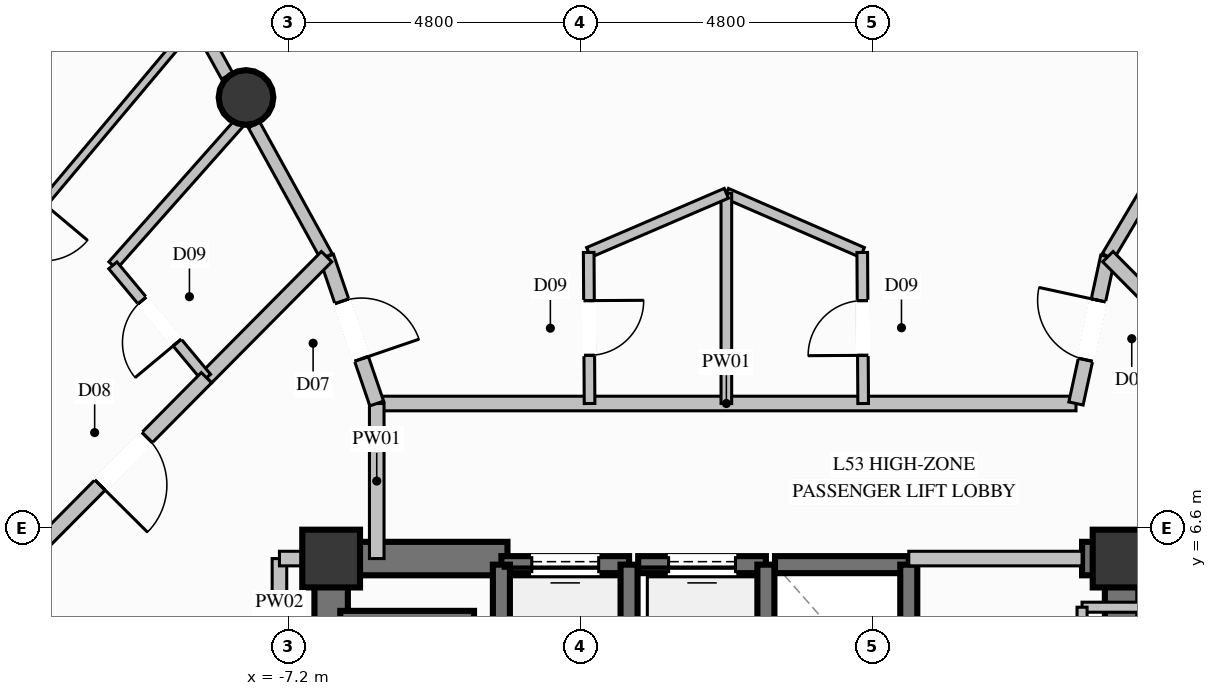
"""IFC4 building model, lengths in metres.
Left out: names, types, materials, properties, quantities, classifications, styles, units other than length and angle.
Written with IfcOpenShell. Run it as: python <this file> out.ifc"""

import sys

from ifc_helpers import new_model, si_unit, direction, frame, frame_2d, origin, origin_2d, place, context, subcontext, project, spatial, rectangle, circle, extrude, element, fill, save


model = new_model("IFC4")
c1 = context("Model", 3, precision=1e-05, world=origin(), true_north=direction((0.0, 1.0)))
c2 = subcontext(c1, "Body", "Model", "MODEL_VIEW")
j1 = project(units=[si_unit("LENGTHUNIT", "METRE"), si_unit("PLANEANGLEUNIT", "RADIAN")], contexts=[c1])
p1 = place(None, origin())
s1 = spatial("IfcSite", under=j1, at=p1, CompositionType="ELEMENT")
p2 = place(p1, origin())
s2 = spatial("IfcBuilding", under=s1, at=p2, CompositionType="ELEMENT")
p3 = place(p2, frame((0.0, 0.0, 205.6)))
s3 = spatial("IfcBuildingStorey", under=s2, at=p3, CompositionType="ELEMENT", Elevation=205.6)
for number, where, z_axis, x_axis in (
    (1, (6.5, 6.1, 0.0), (0.0, 0.0, 1.0), (1.0, 0.0, 0.0)),
    (2, (-6.5, 6.1, 0.0), (0.0, 0.0, 1.0), (1.0, 0.0, 0.0)),
):
    element("IfcColumn", number, at=place(p3, frame(where, z_axis=z_axis, x_axis=x_axis)), inside=s3, PredefinedType="COLUMN", context=c2, shape_type="SweptSolid", body=[
        extrude(rectangle(XDim=0.95, YDim=0.95, at=origin_2d()), origin(), (0.0, 0.0, 1.0), 3.6),
    ])
p4 = place(p3, frame((-6.225, 6.1, 0.0), z_axis=(0.0, 0.0, 1.0), x_axis=(1.0, 0.0, 0.0)))
e3 = element("IfcWall", 3, at=p4, inside=s3, PredefinedType="SHEAR", context=c2, shape_type="SweptSolid", body=[
    extrude(rectangle(XDim=2.625, YDim=0.55, at=frame_2d((1.312, 0.0))), origin(), (0.0, 0.0, 1.0), 3.6),
])
p5 = place(p3, frame((5.85, 6.1, 0.0), z_axis=(0.0, 0.0, 1.0), x_axis=(1.0, 0.0, 0.0)))
e4 = element("IfcWall", 4, at=p5, inside=s3, PredefinedType="SHEAR", context=c2, shape_type="SweptSolid", body=[
    extrude(rectangle(XDim=0.375, YDim=0.55, at=frame_2d((0.188, 0.0))), origin(), (0.0, 0.0, 1.0), 3.6),
])
p6 = place(p3, frame((-6.5, 2.35, 0.0), z_axis=(0.0, 0.0, 1.0), x_axis=(0.0, 1.0, 0.0)))
e5 = element("IfcWall", 5, at=p6, inside=s3, PredefinedType="SHEAR", context=c2, shape_type="SweptSolid", body=[
    extrude(rectangle(XDim=4.025, YDim=0.55, at=frame_2d((2.012, 0.0))), origin(), (0.0, 0.0, 1.0), 3.6),
])
p7 = place(p3, frame((6.5, 3.35, 0.0), z_axis=(0.0, 0.0, 1.0), x_axis=(0.0, 1.0, 0.0)))
e6 = element("IfcWall", 6, at=p7, inside=s3, PredefinedType="SHEAR", context=c2, shape_type="SweptSolid", body=[
    extrude(rectangle(XDim=3.025, YDim=0.55, at=frame_2d((1.512, 0.0))), origin(), (0.0, 0.0, 1.0), 3.6),
])
p8 = place(p3, frame((-7.9, 13.683, 0.0), z_axis=(0.0, 0.0, 1.0), x_axis=(1.0, 0.0, 0.0)))
e7 = element("IfcColumn", 7, at=p8, inside=s3, PredefinedType="COLUMN", context=c2, shape_type="SweptSolid", body=[
    extrude(circle(Radius=0.45, at=origin_2d()), origin(), (0.0, 0.0, 1.0), 3.6),
])
p9 = place(p3, frame((-1.6, 6.0, 0.0), z_axis=(0.0, 0.0, 1.0), x_axis=(-1.0, 0.0, 0.0)))
e8 = element("IfcWall", 8, at=p9, inside=s3, PredefinedType="SOLIDWALL", context=c2, shape_type="SweptSolid", body=[
    extrude(rectangle(XDim=2.1, YDim=0.28, at=frame_2d((1.05, 0.0))), origin(), (0.0, 0.0, 1.0), 3.36),
])
p10 = place(p9, frame((0.5, 0.0, 0.0)))
e9 = element("IfcOpeningElement", 9, at=p10, cuts=e8, PredefinedType="OPENING", context=c2, shape_type="SweptSolid", body=[
    extrude(rectangle(XDim=1.1, YDim=2.2, at=frame_2d((0.55, 1.1))), frame((0.0, 0.15, 0.0), z_axis=(0.0, -1.0, 0.0), x_axis=(1.0, 0.0, 0.0)), (0.0, 0.0, 1.0), 0.3),
])
for number, where, z_axis, x_axis in (
    (10, (-3.7, 6.0, 0.0), (0.0, 0.0, 1.0), (0.0, -1.0, 0.0)),
    (11, (-1.6, 3.5, 0.0), (0.0, 0.0, 1.0), (0.0, 1.0, 0.0)),
):
    element("IfcWall", number, at=place(p3, frame(where, z_axis=z_axis, x_axis=x_axis)), inside=s3, PredefinedType="SOLIDWALL", context=c2, shape_type="SweptSolid", body=[
        extrude(rectangle(XDim=2.5, YDim=0.28, at=frame_2d((1.25, 0.0))), origin(), (0.0, 0.0, 1.0), 3.36),
    ])
p11 = place(p3, frame((0.65, 6.0, 0.0), z_axis=(0.0, 0.0, 1.0), x_axis=(-1.0, 0.0, 0.0)))
e12 = element("IfcWall", 12, at=p11, inside=s3, PredefinedType="SOLIDWALL", context=c2, shape_type="SweptSolid", body=[
    extrude(rectangle(XDim=2.1, YDim=0.28, at=frame_2d((1.05, 0.0))), origin(), (0.0, 0.0, 1.0), 3.36),
])
p12 = place(p11, frame((0.5, 0.0, 0.0)))
e13 = element("IfcOpeningElement", 13, at=p12, cuts=e12, PredefinedType="OPENING", context=c2, shape_type="SweptSolid", body=[
    extrude(rectangle(XDim=1.1, YDim=2.2, at=frame_2d((0.55, 1.1))), frame((0.0, 0.15, 0.0), z_axis=(0.0, -1.0, 0.0), x_axis=(1.0, 0.0, 0.0)), (0.0, 0.0, 1.0), 0.3),
])
p13 = place(p3, frame((0.65, 3.5, 0.0), z_axis=(0.0, 0.0, 1.0), x_axis=(0.0, 1.0, 0.0)))
e14 = element("IfcWall", 14, at=p13, inside=s3, PredefinedType="SOLIDWALL", context=c2, shape_type="SweptSolid", body=[
    extrude(rectangle(XDim=2.5, YDim=0.28, at=frame_2d((1.25, 0.0))), origin(), (0.0, 0.0, 1.0), 3.36),
])
p14 = place(p3, frame((3.0, 6.0, 0.0), z_axis=(0.0, 0.0, 1.0), x_axis=(-1.0, 0.0, 0.0)))
e15 = element("IfcWall", 15, at=p14, inside=s3, PredefinedType="SOLIDWALL", context=c2, shape_type="SweptSolid", body=[
    extrude(rectangle(XDim=2.2, YDim=0.28, at=frame_2d((1.1, 0.0))), origin(), (0.0, 0.0, 1.0), 3.36),
])
p15 = place(p3, frame((3.0, 3.5, 0.0), z_axis=(0.0, 0.0, 1.0), x_axis=(0.0, 1.0, 0.0)))
e16 = element("IfcWall", 16, at=p15, inside=s3, PredefinedType="SOLIDWALL", context=c2, shape_type="SweptSolid", body=[
    extrude(rectangle(XDim=2.5, YDim=0.28, at=frame_2d((1.25, 0.0))), origin(), (0.0, 0.0, 1.0), 3.36),
])
p16 = place(p3, frame((-4.15, 5.1, 0.0), z_axis=(0.0, 0.0, 1.0), x_axis=(-1.0, 0.0, 0.0)))
e17 = element("IfcWall", 17, at=p16, inside=s3, PredefinedType="SOLIDWALL", context=c2, shape_type="SweptSolid", body=[
    extrude(rectangle(XDim=2.2, YDim=0.28, at=frame_2d((1.1, 0.0))), origin(), (0.0, 0.0, 1.0), 3.36),
])
p17 = place(p3, frame((-5.75, 8.65, 0.0), z_axis=(0.0, 0.0, 1.0), x_axis=(1.0, 0.0, 0.0)))
e18 = element("IfcWall", 18, at=p17, inside=s3, PredefinedType="PARTITIONING", context=c2, shape_type="SweptSolid", body=[
    extrude(rectangle(XDim=11.5, YDim=0.24, at=frame_2d((5.75, 0.0))), origin(), (0.0, 0.0, 1.0), 3.36),
])
p18 = place(p3, frame((3.0, 6.1, 0.0), z_axis=(0.0, 0.0, 1.0), x_axis=(1.0, 0.0, 0.0)))
e19 = element("IfcWall", 19, at=p18, inside=s3, PredefinedType="PARTITIONING", context=c2, shape_type="SweptSolid", body=[
    extrude(rectangle(XDim=2.85, YDim=0.24, at=frame_2d((1.425, 0.0))), origin(), (0.0, 0.0, 1.0), 2.445),
])
p19 = place(p3, frame((6.5, 6.1, 0.0), z_axis=(0.0, 0.0, 1.0), x_axis=(1.0, 0.0, 0.0)))
e20 = element("IfcWall", 20, at=p19, inside=s3, PredefinedType="PARTITIONING", context=c2, shape_type="SweptSolid", body=[
    extrude(rectangle(XDim=0.85, YDim=0.24, at=frame_2d((0.425, 0.0))), origin(), (0.0, 0.0, 1.0), 2.877),
])
p20 = place(p3, frame((-5.75, 6.1, 0.0), z_axis=(0.0, 0.0, 1.0), x_axis=(0.0, 1.0, 0.0)))
e21 = element("IfcWall", 21, at=p20, inside=s3, PredefinedType="PARTITIONING", context=c2, shape_type="SweptSolid", body=[
    extrude(rectangle(XDim=2.55, YDim=0.24, at=frame_2d((1.275, 0.0))), origin(), (0.0, 0.0, 1.0), 3.36),
])
p21 = place(p3, frame((-7.35, 4.95, 0.0), z_axis=(0.0, 0.0, 1.0), x_axis=(0.0, 1.0, 0.0)))
e22 = element("IfcWall", 22, at=p21, inside=s3, PredefinedType="PARTITIONING", context=c2, shape_type="SweptSolid", body=[
    extrude(rectangle(XDim=1.15, YDim=0.24, at=frame_2d((0.575, 0.0))), origin(), (0.0, 0.0, 1.0), 2.445),
])
p22 = place(p3, frame((-7.35, 6.1, 0.0), z_axis=(0.0, 0.0, 1.0), x_axis=(1.0, 0.0, 0.0)))
e23 = element("IfcWall", 23, at=p22, inside=s3, PredefinedType="PARTITIONING", context=c2, shape_type="SweptSolid", body=[
    extrude(rectangle(XDim=0.85, YDim=0.24, at=frame_2d((0.425, 0.0))), origin(), (0.0, 0.0, 1.0), 2.877),
])
p23 = place(p3, frame((7.35, 5.3, 0.0), z_axis=(0.0, 0.0, 1.0), x_axis=(-1.0, 0.0, 0.0)))
e24 = element("IfcWall", 24, at=p23, inside=s3, PredefinedType="PARTITIONING", context=c2, shape_type="SweptSolid", body=[
    extrude(rectangle(XDim=1.5, YDim=0.165, at=frame_2d((0.75, 0.0))), origin(), (0.0, 0.0, 1.0), 2.445),
])
p24 = place(p3, frame((5.85, 5.3, 0.0), z_axis=(0.0, 0.0, 1.0), x_axis=(0.0, -1.0, 0.0)))
e25 = element("IfcWall", 25, at=p24, inside=s3, PredefinedType="PARTITIONING", context=c2, shape_type="SweptSolid", body=[
    extrude(rectangle(XDim=1.95, YDim=0.165, at=frame_2d((0.975, 0.0))), origin(), (0.0, 0.0, 1.0), 2.445),
])
p25 = place(p3, frame((6.275, 11.065, 0.0), z_axis=(0.0, 0.0, 1.0), x_axis=(0.511099633632, 0.859521474136, 0.0)))
e26 = element("IfcWall", 26, at=p25, inside=s3, PredefinedType="PARTITIONING", context=c2, shape_type="SweptSolid", body=[
    extrude(rectangle(XDim=2.614, YDim=0.21, at=frame_2d((1.307, 0.0))), origin(), (0.0, 0.0, 1.0), 2.877),
])
p26 = place(p3, frame((-6.575, 11.065, 0.0), z_axis=(0.0, 0.0, 1.0), x_axis=(-0.482312715348, 0.875999112222, 0.0)))
e27 = element("IfcWall", 27, at=p26, inside=s3, PredefinedType="PARTITIONING", context=c2, shape_type="SweptSolid", body=[
    extrude(rectangle(XDim=2.474, YDim=0.21, at=frame_2d((1.237, 0.0))), origin(), (0.0, 0.0, 1.0), 2.877),
])
p27 = place(p3, frame((-8.21, 14.036, 0.0), z_axis=(0.0, 0.0, 1.0), x_axis=(-0.482343563711, 0.875982126842, 0.0)))
e28 = element("IfcWall", 28, at=p27, inside=s3, PredefinedType="PARTITIONING", context=c2, shape_type="SweptSolid", body=[
    extrude(rectangle(XDim=4.522, YDim=0.21, at=frame_2d((2.261, 0.0))), origin(), (0.0, 0.0, 1.0), 3.36),
])
p28 = place(p3, frame((0.0, 12.107, 0.0), z_axis=(0.0, 0.0, 1.0), x_axis=(0.916902788215, -0.399110607431, 0.0)))
e29 = element("IfcWall", 29, at=p28, inside=s3, PredefinedType="PLUMBINGWALL", context=c2, shape_type="SweptSolid", body=[
    extrude(rectangle(XDim=2.438, YDim=0.175, at=frame_2d((1.219, 0.0))), origin(), (0.0, 0.0, 1.0), 3.36),
])
p29 = place(p3, frame((0.0, 12.107, 0.0), z_axis=(0.0, 0.0, 1.0), x_axis=(0.0, -1.0, 0.0)))
e30 = element("IfcWall", 30, at=p29, inside=s3, PredefinedType="PLUMBINGWALL", context=c2, shape_type="SweptSolid", body=[
    extrude(rectangle(XDim=3.457, YDim=0.175, at=frame_2d((1.729, 0.0))), origin(), (0.0, 0.0, 1.0), 3.36),
])
p30 = place(p3, frame((2.25, 8.65, 0.0), z_axis=(0.0, 0.0, 1.0), x_axis=(-0.005994978263, 0.999982029956, 0.0)))
e31 = element("IfcWall", 31, at=p30, inside=s3, PredefinedType="PLUMBINGWALL", context=c2, shape_type="SweptSolid", body=[
    extrude(rectangle(XDim=2.484, YDim=0.175, at=frame_2d((1.242, 0.0))), origin(), (0.0, 0.0, 1.0), 3.36),
])
p31 = place(p30, frame((0.792, 0.0, 0.0)))
e32 = element("IfcOpeningElement", 32, at=p31, cuts=e31, PredefinedType="OPENING", context=c2, shape_type="SweptSolid", body=[
    extrude(rectangle(XDim=0.9, YDim=2.1, at=frame_2d((0.45, 1.05))), frame((0.0, 0.098, 0.0), z_axis=(0.0, -1.0, 0.0), x_axis=(1.0, 0.0, 0.0)), (0.0, 0.0, 1.0), 0.195),
])
p32 = place(p3, frame((5.75, 8.65, 0.0), z_axis=(0.0, 0.0, 1.0), x_axis=(0.212388632151, 0.977185278713, 0.0)))
e33 = element("IfcWall", 33, at=p32, inside=s3, PredefinedType="PARTITIONING", context=c2, shape_type="SweptSolid", body=[
    extrude(rectangle(XDim=2.471, YDim=0.24, at=frame_2d((1.236, 0.0))), origin(), (0.0, 0.0, 1.0), 3.36),
])
p33 = place(p32, frame((0.736, 0.0, 0.0)))
e34 = element("IfcOpeningElement", 34, at=p33, cuts=e33, PredefinedType="OPENING", context=c2, shape_type="SweptSolid", body=[
    extrude(rectangle(XDim=1.0, YDim=2.2, at=frame_2d((0.5, 1.1))), frame((0.0, 0.13, 0.0), z_axis=(0.0, -1.0, 0.0), x_axis=(1.0, 0.0, 0.0)), (0.0, 0.0, 1.0), 0.26),
])
p34 = place(p3, frame((-2.264, 11.134, 0.0), z_axis=(0.0, 0.0, 1.0), x_axis=(0.918755099671, 0.3948278952, 0.0)))
e35 = element("IfcWall", 35, at=p34, inside=s3, PredefinedType="PLUMBINGWALL", context=c2, shape_type="SweptSolid", body=[
    extrude(rectangle(XDim=2.464, YDim=0.175, at=frame_2d((1.232, 0.0))), origin(), (0.0, 0.0, 1.0), 3.36),
])
p35 = place(p3, frame((-2.264, 11.134, 0.0), z_axis=(0.0, 0.0, 1.0), x_axis=(0.005601877704, -0.99998430936, 0.0)))
e36 = element("IfcWall", 36, at=p35, inside=s3, PredefinedType="PLUMBINGWALL", context=c2, shape_type="SweptSolid", body=[
    extrude(rectangle(XDim=2.484, YDim=0.175, at=frame_2d((1.242, 0.0))), origin(), (0.0, 0.0, 1.0), 3.36),
])
p36 = place(p35, frame((0.792, 0.0, 0.0)))
e37 = element("IfcOpeningElement", 37, at=p36, cuts=e36, PredefinedType="OPENING", context=c2, shape_type="SweptSolid", body=[
    extrude(rectangle(XDim=0.9, YDim=2.1, at=frame_2d((0.45, 1.05))), frame((0.0, 0.098, 0.0), z_axis=(0.0, -1.0, 0.0), x_axis=(1.0, 0.0, 0.0)), (0.0, 0.0, 1.0), 0.195),
])
p37 = place(p3, frame((-6.575, 11.065, 0.0), z_axis=(0.0, 0.0, 1.0), x_axis=(0.323250422642, -0.946313459833, 0.0)))
e38 = element("IfcWall", 38, at=p37, inside=s3, PredefinedType="PARTITIONING", context=c2, shape_type="SweptSolid", body=[
    extrude(rectangle(XDim=2.552, YDim=0.24, at=frame_2d((1.276, 0.0))), origin(), (0.0, 0.0, 1.0), 3.36),
])
p38 = place(p37, frame((0.776, 0.0, 0.0)))
e39 = element("IfcOpeningElement", 39, at=p38, cuts=e38, PredefinedType="OPENING", context=c2, shape_type="SweptSolid", body=[
    extrude(rectangle(XDim=1.0, YDim=2.2, at=frame_2d((0.5, 1.1))), frame((0.0, 0.13, 0.0), z_axis=(0.0, -1.0, 0.0), x_axis=(1.0, 0.0, 0.0)), (0.0, 0.0, 1.0), 0.26),
])
p39 = place(p3, frame((-6.575, 11.065, 0.0), z_axis=(0.0, 0.0, 1.0), x_axis=(-0.704271845888, -0.709930395947, 0.0)))
e40 = element("IfcWall", 40, at=p39, inside=s3, PredefinedType="PARTITIONING", context=c2, shape_type="SweptSolid", body=[
    extrude(rectangle(XDim=2.804, YDim=0.24, at=frame_2d((1.402, 0.0))), origin(), (0.0, 0.0, 1.0), 3.36),
])
p40 = place(p3, frame((-7.872, 13.422, 0.0), z_axis=(0.0, 0.0, 1.0), x_axis=(-0.663660752153, -0.748033693126, 0.0)))
e41 = element("IfcWall", 41, at=p40, inside=s3, PredefinedType="PLUMBINGWALL", context=c2, shape_type="SweptSolid", body=[
    extrude(rectangle(XDim=3.342, YDim=0.175, at=frame_2d((1.671, 0.0))), origin(), (0.0, 0.0, 1.0), 2.929),
])
p41 = place(p3, frame((-8.55, 9.074, 0.0), z_axis=(0.0, 0.0, 1.0), x_axis=(-0.640164435278, 0.768237916147, 0.0)))
e42 = element("IfcWall", 42, at=p41, inside=s3, PredefinedType="PLUMBINGWALL", context=c2, shape_type="SweptSolid", body=[
    extrude(rectangle(XDim=2.406, YDim=0.175, at=frame_2d((1.203, 0.0))), origin(), (0.0, 0.0, 1.0), 3.36),
])
p42 = place(p41, frame((0.753, 0.0, 0.0)))
e43 = element("IfcOpeningElement", 43, at=p42, cuts=e42, PredefinedType="OPENING", context=c2, shape_type="SweptSolid", body=[
    extrude(rectangle(XDim=0.9, YDim=2.1, at=frame_2d((0.45, 1.05))), frame((0.0, 0.098, 0.0), z_axis=(0.0, -1.0, 0.0), x_axis=(1.0, 0.0, 0.0)), (0.0, 0.0, 1.0), 0.195),
])
p43 = place(p3, frame((-8.55, 9.074, 0.0), z_axis=(0.0, 0.0, 1.0), x_axis=(-0.704390934975, -0.709812236246, 0.0)))
e44 = element("IfcWall", 44, at=p43, inside=s3, PredefinedType="PARTITIONING", context=c2, shape_type="SweptSolid", body=[
    extrude(rectangle(XDim=3.873, YDim=0.24, at=frame_2d((1.937, 0.0))), origin(), (0.0, 0.0, 1.0), 3.36),
])
p44 = place(p43, frame((1.386, 0.0, 0.0)))
e45 = element("IfcOpeningElement", 45, at=p44, cuts=e44, PredefinedType="OPENING", context=c2, shape_type="SweptSolid", body=[
    extrude(rectangle(XDim=1.1, YDim=2.3, at=frame_2d((0.55, 1.15))), frame((0.0, 0.13, 0.0), z_axis=(0.0, -1.0, 0.0), x_axis=(1.0, 0.0, 0.0)), (0.0, 0.0, 1.0), 0.26),
])
p45 = place(p3, frame((-8.712, 14.947, 0.0), z_axis=(0.0, 0.0, 1.0), x_axis=(-0.642897719882, -0.765952036208, 0.0)))
e46 = element("IfcWall", 46, at=p45, inside=s3, PredefinedType="PARTITIONING", context=c2, shape_type="SweptSolid", body=[
    extrude(rectangle(XDim=8.793, YDim=0.135, at=frame_2d((4.396, 0.0))), origin(), (0.0, 0.0, 1.0), 3.36),
])
p46 = place(p45, frame((3.921, 0.0, 0.0)))
e47 = element("IfcOpeningElement", 47, at=p46, cuts=e46, PredefinedType="OPENING", context=c2, shape_type="SweptSolid", body=[
    extrude(rectangle(XDim=0.95, YDim=2.1, at=frame_2d((0.475, 1.05))), frame((0.0, 0.078, 0.0), z_axis=(0.0, -1.0, 0.0), x_axis=(1.0, 0.0, 0.0)), (0.0, 0.0, 1.0), 0.155),
])
p47 = place(p3, frame((10.978, 6.325, 0.0), z_axis=(0.0, 0.0, 1.0), x_axis=(-0.704340920508, 0.709861865223, 0.0)))
e48 = element("IfcWall", 48, at=p47, inside=s3, PredefinedType="PARTITIONING", context=c2, shape_type="SweptSolid", body=[
    extrude(rectangle(XDim=6.677, YDim=0.24, at=frame_2d((3.339, 0.0))), origin(), (0.0, 0.0, 1.0), 3.36),
])
p48 = place(p10, origin())
e49 = element("IfcDoor", 49, at=p48, inside=s3, OperationType="SLIDING_TO_LEFT", PredefinedType="DOOR", context=c2, shape_type="SweptSolid", body=[
    extrude(rectangle(XDim=1.1, YDim=2.2, at=frame_2d((0.55, 1.1))), frame((0.0, 0.025, 0.0), z_axis=(0.0, -1.0, 0.0), x_axis=(1.0, 0.0, 0.0)), (0.0, 0.0, 1.0), 0.05),
])
fill(e9, e49)
p49 = place(p12, origin())
e50 = element("IfcDoor", 50, at=p49, inside=s3, OperationType="SLIDING_TO_LEFT", PredefinedType="DOOR", context=c2, shape_type="SweptSolid", body=[
    extrude(rectangle(XDim=1.1, YDim=2.2, at=frame_2d((0.55, 1.1))), frame((0.0, 0.025, 0.0), z_axis=(0.0, -1.0, 0.0), x_axis=(1.0, 0.0, 0.0)), (0.0, 0.0, 1.0), 0.05),
])
fill(e13, e50)
p50 = place(p31, origin())
e51 = element("IfcDoor", 51, at=p50, inside=s3, OperationType="SINGLE_SWING_LEFT", PredefinedType="DOOR", context=c2, shape_type="SweptSolid", body=[
    extrude(rectangle(XDim=0.9, YDim=2.1, at=frame_2d((0.45, 1.05))), frame((0.0, 0.025, 0.0), z_axis=(0.0, -1.0, 0.0), x_axis=(1.0, 0.0, 0.0)), (0.0, 0.0, 1.0), 0.05),
])
fill(e32, e51)
p51 = place(p33, origin())
e52 = element("IfcDoor", 52, at=p51, inside=s3, OperationType="SINGLE_SWING_RIGHT", PredefinedType="DOOR", context=c2, shape_type="SweptSolid", body=[
    extrude(rectangle(XDim=1.0, YDim=2.2, at=frame_2d((0.5, 1.1))), frame((0.0, 0.025, 0.0), z_axis=(0.0, -1.0, 0.0), x_axis=(1.0, 0.0, 0.0)), (0.0, 0.0, 1.0), 0.05),
])
fill(e34, e52)
p52 = place(p36, origin())
e53 = element("IfcDoor", 53, at=p52, inside=s3, OperationType="SINGLE_SWING_LEFT", PredefinedType="DOOR", context=c2, shape_type="SweptSolid", body=[
    extrude(rectangle(XDim=0.9, YDim=2.1, at=frame_2d((0.45, 1.05))), frame((0.0, 0.025, 0.0), z_axis=(0.0, -1.0, 0.0), x_axis=(1.0, 0.0, 0.0)), (0.0, 0.0, 1.0), 0.05),
])
fill(e37, e53)
p53 = place(p38, origin())
e54 = element("IfcDoor", 54, at=p53, inside=s3, OperationType="SINGLE_SWING_RIGHT", PredefinedType="DOOR", context=c2, shape_type="SweptSolid", body=[
    extrude(rectangle(XDim=1.0, YDim=2.2, at=frame_2d((0.5, 1.1))), frame((0.0, 0.025, 0.0), z_axis=(0.0, -1.0, 0.0), x_axis=(1.0, 0.0, 0.0)), (0.0, 0.0, 1.0), 0.05),
])
fill(e39, e54)
p54 = place(p42, origin())
e55 = element("IfcDoor", 55, at=p54, inside=s3, OperationType="SINGLE_SWING_LEFT", PredefinedType="DOOR", context=c2, shape_type="SweptSolid", body=[
    extrude(rectangle(XDim=0.9, YDim=2.1, at=frame_2d((0.45, 1.05))), frame((0.0, 0.025, 0.0), z_axis=(0.0, -1.0, 0.0), x_axis=(1.0, 0.0, 0.0)), (0.0, 0.0, 1.0), 0.05),
])
fill(e43, e55)
p55 = place(p44, origin())
e56 = element("IfcDoor", 56, at=p55, inside=s3, OperationType="SINGLE_SWING_RIGHT", PredefinedType="DOOR", context=c2, shape_type="SweptSolid", body=[
    extrude(rectangle(XDim=1.1, YDim=2.3, at=frame_2d((0.55, 1.15))), frame((0.0, 0.025, 0.0), z_axis=(0.0, -1.0, 0.0), x_axis=(1.0, 0.0, 0.0)), (0.0, 0.0, 1.0), 0.05),
])
fill(e45, e56)
save(model, sys.argv[1])
